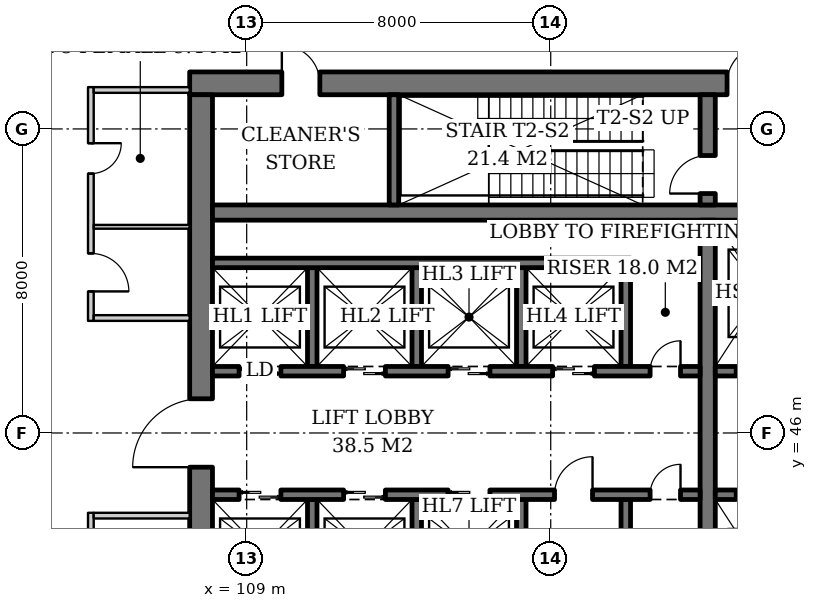
"""IFC4 building model, lengths in metres.
Left out: names, types, materials, properties, quantities, classifications, styles, units other than length and angle.
Written with IfcOpenShell. Run it as: python <this file> out.ifc"""

import sys

from ifc_helpers import new_model, si_unit, direction, frame, frame_2d, origin, place, context, subcontext, project, spatial, rectangle, extrude, element, fill, save


model = new_model("IFC4")
c1 = context("Model", 3, precision=1e-05, world=origin(), true_north=direction((0.0, 1.0)))
c2 = subcontext(c1, "Body", "Model", "MODEL_VIEW")
j1 = project(units=[si_unit("LENGTHUNIT", "METRE"), si_unit("PLANEANGLEUNIT", "RADIAN")], contexts=[c1])
p1 = place(None, origin())
s1 = spatial("IfcSite", under=j1, at=p1, CompositionType="ELEMENT")
p2 = place(p1, origin())
s2 = spatial("IfcBuilding", under=s1, at=p2, CompositionType="ELEMENT")
p3 = place(p2, frame((0.0, 0.0, -5.0)))
s3 = spatial("IfcBuildingStorey", under=s2, at=p3, CompositionType="ELEMENT", Elevation=-5.0)
p4 = place(p3, frame((107.5, 55.2, 0.0), z_axis=(0.0, 0.0, 1.0), x_axis=(1.0, 0.0, 0.0)))
e1 = element("IfcWall", 1, at=p4, inside=s3, PredefinedType="SHEAR", context=c2, shape_type="SweptSolid", body=[
    extrude(rectangle(XDim=19.0, YDim=0.6, at=frame_2d((9.5, 0.0))), origin(), (0.0, 0.0, 1.0), 5.0),
])
p5 = place(p4, frame((14.14, 0.0, 0.0)))
e2 = element("IfcOpeningElement", 2, at=p5, cuts=e1, PredefinedType="OPENING", context=c2, shape_type="SweptSolid", body=[
    extrude(rectangle(XDim=1.0, YDim=2.1, at=frame_2d((0.5, 1.05))), frame((0.0, 0.31, 0.0), z_axis=(0.0, -1.0, 0.0), x_axis=(1.0, 0.0, 0.0)), (0.0, 0.0, 1.0), 0.62),
])
p6 = place(p4, frame((2.425, 0.0, 0.0)))
e3 = element("IfcOpeningElement", 3, at=p6, cuts=e1, PredefinedType="OPENING", context=c2, shape_type="SweptSolid", body=[
    extrude(rectangle(XDim=1.0, YDim=2.1, at=frame_2d((0.5, 1.05))), frame((0.0, 0.31, 0.0), z_axis=(0.0, -1.0, 0.0), x_axis=(1.0, 0.0, 0.0)), (0.0, 0.0, 1.0), 0.62),
])
p7 = place(p3, frame((107.8, 37.1, 0.0), z_axis=(0.0, 0.0, 1.0), x_axis=(0.0, 1.0, 0.0)))
e4 = element("IfcWall", 4, at=p7, inside=s3, PredefinedType="SHEAR", context=c2, shape_type="SweptSolid", body=[
    extrude(rectangle(XDim=17.8, YDim=0.6, at=frame_2d((8.9, 0.0))), origin(), (0.0, 0.0, 1.0), 5.0),
])
p8 = place(p7, frame((8.0, 0.0, 0.0)))
e5 = element("IfcOpeningElement", 5, at=p8, cuts=e4, PredefinedType="OPENING", context=c2, shape_type="SweptSolid", body=[
    extrude(rectangle(XDim=1.8, YDim=2.4, at=frame_2d((0.9, 1.2))), frame((0.0, 0.31, 0.0), z_axis=(0.0, -1.0, 0.0), x_axis=(1.0, 0.0, 0.0)), (0.0, 0.0, 1.0), 0.62),
])
p9 = place(p3, frame((108.1, 51.8, 0.0), z_axis=(0.0, 0.0, 1.0), x_axis=(1.0, 0.0, 0.0)))
e6 = element("IfcWall", 6, at=p9, inside=s3, PredefinedType="SHEAR", context=c2, shape_type="SweptSolid", body=[
    extrude(rectangle(XDim=17.8, YDim=0.4, at=frame_2d((8.9, 0.0))), origin(), (0.0, 0.0, 1.0), 5.0),
])
p10 = place(p3, frame((121.13, 40.4, 0.0), z_axis=(0.0, 0.0, 1.0), x_axis=(0.0, 1.0, 0.0)))
e7 = element("IfcWall", 7, at=p10, inside=s3, PredefinedType="SHEAR", context=c2, shape_type="SweptSolid", body=[
    extrude(rectangle(XDim=11.2, YDim=0.4, at=frame_2d((5.6, 0.0))), origin(), (0.0, 0.0, 1.0), 5.0),
])
p11 = place(p3, frame((121.13, 52.0, 0.0), z_axis=(0.0, 0.0, 1.0), x_axis=(0.0, 1.0, 0.0)))
e8 = element("IfcWall", 8, at=p11, inside=s3, PredefinedType="SHEAR", context=c2, shape_type="SweptSolid", body=[
    extrude(rectangle(XDim=2.9, YDim=0.4, at=frame_2d((1.45, 0.0))), origin(), (0.0, 0.0, 1.0), 5.0),
])
p12 = place(p11, frame((0.3, 0.0, 0.0)))
e9 = element("IfcOpeningElement", 9, at=p12, cuts=e8, PredefinedType="OPENING", context=c2, shape_type="SweptSolid", body=[
    extrude(rectangle(XDim=1.0, YDim=2.1, at=frame_2d((0.5, 1.05))), frame((0.0, 0.21, 0.0), z_axis=(0.0, -1.0, 0.0), x_axis=(1.0, 0.0, 0.0)), (0.0, 0.0, 1.0), 0.42),
])
p13 = place(p3, frame((112.875, 52.0, 0.0), z_axis=(0.0, 0.0, 1.0), x_axis=(0.0, 1.0, 0.0)))
e10 = element("IfcWall", 10, at=p13, inside=s3, PredefinedType="SHEAR", context=c2, shape_type="SweptSolid", body=[
    extrude(rectangle(XDim=2.9, YDim=0.25, at=frame_2d((1.45, 0.0))), origin(), (0.0, 0.0, 1.0), 5.0),
])
for number, where, z_axis, x_axis in (
    (11, (110.725, 47.75, 0.0), (0.0, 0.0, 1.0), (0.0, 1.0, 0.0)),
    (12, (113.475, 47.75, 0.0), (0.0, 0.0, 1.0), (0.0, 1.0, 0.0)),
    (13, (116.225, 47.75, 0.0), (0.0, 0.0, 1.0), (0.0, 1.0, 0.0)),
    (14, (118.975, 47.75, 0.0), (0.0, 0.0, 1.0), (0.0, 1.0, 0.0)),
):
    element("IfcWall", number, at=place(p3, frame(where, z_axis=z_axis, x_axis=x_axis)), inside=s3, PredefinedType="SHEAR", context=c2, shape_type="SweptSolid", body=[
        extrude(rectangle(XDim=2.6, YDim=0.25, at=frame_2d((1.3, 0.0))), origin(), (0.0, 0.0, 1.0), 5.0),
    ])
p14 = place(p3, frame((108.1, 50.475, 0.0), z_axis=(0.0, 0.0, 1.0), x_axis=(1.0, 0.0, 0.0)))
e15 = element("IfcWall", 15, at=p14, inside=s3, PredefinedType="SHEAR", context=c2, shape_type="SweptSolid", body=[
    extrude(rectangle(XDim=11.0, YDim=0.25, at=frame_2d((5.5, 0.0))), origin(), (0.0, 0.0, 1.0), 5.0),
])
p15 = place(p3, frame((108.1, 47.625, 0.0), z_axis=(0.0, 0.0, 1.0), x_axis=(1.0, 0.0, 0.0)))
e16 = element("IfcWall", 16, at=p15, inside=s3, PredefinedType="SHEAR", context=c2, shape_type="SweptSolid", body=[
    extrude(rectangle(XDim=12.83, YDim=0.25, at=frame_2d((6.415, 0.0))), origin(), (0.0, 0.0, 1.0), 5.0),
])
p16 = place(p15, frame((0.7, 0.0, 0.0)))
e17 = element("IfcOpeningElement", 17, at=p16, cuts=e16, PredefinedType="OPENING", context=c2, shape_type="SweptSolid", body=[
    extrude(rectangle(XDim=1.1, YDim=2.2, at=frame_2d((0.55, 1.1))), frame((0.0, 0.135, 0.0), z_axis=(0.0, -1.0, 0.0), x_axis=(1.0, 0.0, 0.0)), (0.0, 0.0, 1.0), 0.27),
])
p17 = place(p15, frame((3.45, 0.0, 0.0)))
e18 = element("IfcOpeningElement", 18, at=p17, cuts=e16, PredefinedType="OPENING", context=c2, shape_type="SweptSolid", body=[
    extrude(rectangle(XDim=1.1, YDim=2.2, at=frame_2d((0.55, 1.1))), frame((0.0, 0.135, 0.0), z_axis=(0.0, -1.0, 0.0), x_axis=(1.0, 0.0, 0.0)), (0.0, 0.0, 1.0), 0.27),
])
p18 = place(p15, frame((6.2, 0.0, 0.0)))
e19 = element("IfcOpeningElement", 19, at=p18, cuts=e16, PredefinedType="OPENING", context=c2, shape_type="SweptSolid", body=[
    extrude(rectangle(XDim=1.1, YDim=2.2, at=frame_2d((0.55, 1.1))), frame((0.0, 0.135, 0.0), z_axis=(0.0, -1.0, 0.0), x_axis=(1.0, 0.0, 0.0)), (0.0, 0.0, 1.0), 0.27),
])
p19 = place(p15, frame((8.95, 0.0, 0.0)))
e20 = element("IfcOpeningElement", 20, at=p19, cuts=e16, PredefinedType="OPENING", context=c2, shape_type="SweptSolid", body=[
    extrude(rectangle(XDim=1.1, YDim=2.2, at=frame_2d((0.55, 1.1))), frame((0.0, 0.135, 0.0), z_axis=(0.0, -1.0, 0.0), x_axis=(1.0, 0.0, 0.0)), (0.0, 0.0, 1.0), 0.27),
])
p20 = place(p15, frame((11.515, 0.0, 0.0)))
e21 = element("IfcOpeningElement", 21, at=p20, cuts=e16, PredefinedType="OPENING", context=c2, shape_type="SweptSolid", body=[
    extrude(rectangle(XDim=0.8, YDim=2.0, at=frame_2d((0.4, 1.0))), frame((0.0, 0.135, 0.0), z_axis=(0.0, -1.0, 0.0), x_axis=(1.0, 0.0, 0.0)), (0.0, 0.0, 1.0), 0.27),
])
for number, where, z_axis, x_axis in (
    (22, (110.725, 44.25, 0.0), (0.0, 0.0, 1.0), (0.0, -1.0, 0.0)),
    (23, (113.475, 44.25, 0.0), (0.0, 0.0, 1.0), (0.0, -1.0, 0.0)),
    (24, (116.225, 44.25, 0.0), (0.0, 0.0, 1.0), (0.0, -1.0, 0.0)),
    (25, (118.975, 44.25, 0.0), (0.0, 0.0, 1.0), (0.0, -1.0, 0.0)),
):
    element("IfcWall", number, at=place(p3, frame(where, z_axis=z_axis, x_axis=x_axis)), inside=s3, PredefinedType="SHEAR", context=c2, shape_type="SweptSolid", body=[
        extrude(rectangle(XDim=2.6, YDim=0.25, at=frame_2d((1.3, 0.0))), origin(), (0.0, 0.0, 1.0), 5.0),
    ])
p21 = place(p3, frame((108.1, 44.375, 0.0), z_axis=(0.0, 0.0, 1.0), x_axis=(1.0, 0.0, 0.0)))
e26 = element("IfcWall", 26, at=p21, inside=s3, PredefinedType="SHEAR", context=c2, shape_type="SweptSolid", body=[
    extrude(rectangle(XDim=12.83, YDim=0.25, at=frame_2d((6.415, 0.0))), origin(), (0.0, 0.0, 1.0), 5.0),
])
p22 = place(p21, frame((0.7, 0.0, 0.0)))
e27 = element("IfcOpeningElement", 27, at=p22, cuts=e26, PredefinedType="OPENING", context=c2, shape_type="SweptSolid", body=[
    extrude(rectangle(XDim=1.1, YDim=2.2, at=frame_2d((0.55, 1.1))), frame((0.0, 0.135, 0.0), z_axis=(0.0, -1.0, 0.0), x_axis=(1.0, 0.0, 0.0)), (0.0, 0.0, 1.0), 0.27),
])
p23 = place(p21, frame((3.45, 0.0, 0.0)))
e28 = element("IfcOpeningElement", 28, at=p23, cuts=e26, PredefinedType="OPENING", context=c2, shape_type="SweptSolid", body=[
    extrude(rectangle(XDim=1.1, YDim=2.2, at=frame_2d((0.55, 1.1))), frame((0.0, 0.135, 0.0), z_axis=(0.0, -1.0, 0.0), x_axis=(1.0, 0.0, 0.0)), (0.0, 0.0, 1.0), 0.27),
])
p24 = place(p21, frame((6.2, 0.0, 0.0)))
e29 = element("IfcOpeningElement", 29, at=p24, cuts=e26, PredefinedType="OPENING", context=c2, shape_type="SweptSolid", body=[
    extrude(rectangle(XDim=1.1, YDim=2.2, at=frame_2d((0.55, 1.1))), frame((0.0, 0.135, 0.0), z_axis=(0.0, -1.0, 0.0), x_axis=(1.0, 0.0, 0.0)), (0.0, 0.0, 1.0), 0.27),
])
p25 = place(p21, frame((9.0, 0.0, 0.0)))
e30 = element("IfcOpeningElement", 30, at=p25, cuts=e26, PredefinedType="OPENING", context=c2, shape_type="SweptSolid", body=[
    extrude(rectangle(XDim=1.0, YDim=2.1, at=frame_2d((0.5, 1.05))), frame((0.0, 0.135, 0.0), z_axis=(0.0, -1.0, 0.0), x_axis=(1.0, 0.0, 0.0)), (0.0, 0.0, 1.0), 0.27),
])
p26 = place(p21, frame((11.515, 0.0, 0.0)))
e31 = element("IfcOpeningElement", 31, at=p26, cuts=e26, PredefinedType="OPENING", context=c2, shape_type="SweptSolid", body=[
    extrude(rectangle(XDim=0.8, YDim=2.0, at=frame_2d((0.4, 1.0))), frame((0.0, 0.135, 0.0), z_axis=(0.0, -1.0, 0.0), x_axis=(1.0, 0.0, 0.0)), (0.0, 0.0, 1.0), 0.27),
])
p27 = place(p3, frame((121.33, 47.625, 0.0), z_axis=(0.0, 0.0, 1.0), x_axis=(1.0, 0.0, 0.0)))
e32 = element("IfcWall", 32, at=p27, inside=s3, PredefinedType="SHEAR", context=c2, shape_type="SweptSolid", body=[
    extrude(rectangle(XDim=4.57, YDim=0.25, at=frame_2d((2.285, 0.0))), origin(), (0.0, 0.0, 1.0), 5.0),
])
p28 = place(p27, frame((0.55, 0.0, 0.0)))
e33 = element("IfcOpeningElement", 33, at=p28, cuts=e32, PredefinedType="OPENING", context=c2, shape_type="SweptSolid", body=[
    extrude(rectangle(XDim=1.4, YDim=2.4, at=frame_2d((0.7, 1.2))), frame((0.0, 0.135, 0.0), z_axis=(0.0, -1.0, 0.0), x_axis=(1.0, 0.0, 0.0)), (0.0, 0.0, 1.0), 0.27),
])
p29 = place(p27, frame((3.26, 0.0, 0.0)))
e34 = element("IfcOpeningElement", 34, at=p29, cuts=e32, PredefinedType="OPENING", context=c2, shape_type="SweptSolid", body=[
    extrude(rectangle(XDim=0.8, YDim=2.0, at=frame_2d((0.4, 1.0))), frame((0.0, 0.135, 0.0), z_axis=(0.0, -1.0, 0.0), x_axis=(1.0, 0.0, 0.0)), (0.0, 0.0, 1.0), 0.27),
])
p30 = place(p3, frame((121.33, 44.375, 0.0), z_axis=(0.0, 0.0, 1.0), x_axis=(1.0, 0.0, 0.0)))
e35 = element("IfcWall", 35, at=p30, inside=s3, PredefinedType="SHEAR", context=c2, shape_type="SweptSolid", body=[
    extrude(rectangle(XDim=4.57, YDim=0.25, at=frame_2d((2.285, 0.0))), origin(), (0.0, 0.0, 1.0), 5.0),
])
p31 = place(p30, frame((0.55, 0.0, 0.0)))
e36 = element("IfcOpeningElement", 36, at=p31, cuts=e35, PredefinedType="OPENING", context=c2, shape_type="SweptSolid", body=[
    extrude(rectangle(XDim=1.4, YDim=2.4, at=frame_2d((0.7, 1.2))), frame((0.0, 0.135, 0.0), z_axis=(0.0, -1.0, 0.0), x_axis=(1.0, 0.0, 0.0)), (0.0, 0.0, 1.0), 0.27),
])
p32 = place(p30, frame((3.26, 0.0, 0.0)))
e37 = element("IfcOpeningElement", 37, at=p32, cuts=e35, PredefinedType="OPENING", context=c2, shape_type="SweptSolid", body=[
    extrude(rectangle(XDim=0.8, YDim=2.0, at=frame_2d((0.4, 1.0))), frame((0.0, 0.135, 0.0), z_axis=(0.0, -1.0, 0.0), x_axis=(1.0, 0.0, 0.0)), (0.0, 0.0, 1.0), 0.27),
])
p33 = place(p3, frame((104.9, 55.1, 0.0), z_axis=(0.0, 0.0, 1.0), x_axis=(0.0, -1.0, 0.0)))
e38 = element("IfcWall", 38, at=p33, inside=s3, PredefinedType="PARTITIONING", context=c2, shape_type="SweptSolid", body=[
    extrude(rectangle(XDim=6.15, YDim=0.15, at=frame_2d((3.075, 0.0))), origin(), (0.0, 0.0, 1.0), 3.9),
])
p34 = place(p33, frame((1.475, 0.0, 0.0)))
e39 = element("IfcOpeningElement", 39, at=p34, cuts=e38, PredefinedType="OPENING", context=c2, shape_type="SweptSolid", body=[
    extrude(rectangle(XDim=0.8, YDim=2.1, at=frame_2d((0.4, 1.05))), frame((0.0, 0.085, 0.0), z_axis=(0.0, -1.0, 0.0), x_axis=(1.0, 0.0, 0.0)), (0.0, 0.0, 1.0), 0.17),
])
p35 = place(p33, frame((4.375, 0.0, 0.0)))
e40 = element("IfcOpeningElement", 40, at=p35, cuts=e38, PredefinedType="OPENING", context=c2, shape_type="SweptSolid", body=[
    extrude(rectangle(XDim=1.0, YDim=2.1, at=frame_2d((0.5, 1.05))), frame((0.0, 0.085, 0.0), z_axis=(0.0, -1.0, 0.0), x_axis=(1.0, 0.0, 0.0)), (0.0, 0.0, 1.0), 0.17),
])
p36 = place(p3, frame((104.975, 55.025, 0.0), z_axis=(0.0, 0.0, 1.0), x_axis=(1.0, 0.0, 0.0)))
e41 = element("IfcWall", 41, at=p36, inside=s3, PredefinedType="PARTITIONING", context=c2, shape_type="SweptSolid", body=[
    extrude(rectangle(XDim=2.525, YDim=0.15, at=frame_2d((1.262, 0.0))), origin(), (0.0, 0.0, 1.0), 3.9),
])
p37 = place(p3, frame((104.975, 51.425, 0.0), z_axis=(0.0, 0.0, 1.0), x_axis=(1.0, 0.0, 0.0)))
e42 = element("IfcWall", 42, at=p37, inside=s3, PredefinedType="SOLIDWALL", context=c2, shape_type="SweptSolid", body=[
    extrude(rectangle(XDim=2.525, YDim=0.1, at=frame_2d((1.262, 0.0))), origin(), (0.0, 0.0, 1.0), 4.7),
])
p38 = place(p3, frame((104.975, 49.025, 0.0), z_axis=(0.0, 0.0, 1.0), x_axis=(1.0, 0.0, 0.0)))
e43 = element("IfcWall", 43, at=p38, inside=s3, PredefinedType="PARTITIONING", context=c2, shape_type="SweptSolid", body=[
    extrude(rectangle(XDim=2.525, YDim=0.15, at=frame_2d((1.262, 0.0))), origin(), (0.0, 0.0, 1.0), 4.7),
])
p39 = place(p3, frame((104.9, 43.9, 0.0), z_axis=(0.0, 0.0, 1.0), x_axis=(0.0, -1.0, 0.0)))
e44 = element("IfcWall", 44, at=p39, inside=s3, PredefinedType="PARTITIONING", context=c2, shape_type="SweptSolid", body=[
    extrude(rectangle(XDim=3.75, YDim=0.15, at=frame_2d((1.875, 0.0))), origin(), (0.0, 0.0, 1.0), 3.947),
])
p40 = place(p39, frame((1.475, 0.0, 0.0)))
e45 = element("IfcOpeningElement", 45, at=p40, cuts=e44, PredefinedType="OPENING", context=c2, shape_type="SweptSolid", body=[
    extrude(rectangle(XDim=0.8, YDim=2.1, at=frame_2d((0.4, 1.05))), frame((0.0, 0.085, 0.0), z_axis=(0.0, -1.0, 0.0), x_axis=(1.0, 0.0, 0.0)), (0.0, 0.0, 1.0), 0.17),
])
p41 = place(p3, frame((104.975, 43.825, 0.0), z_axis=(0.0, 0.0, 1.0), x_axis=(1.0, 0.0, 0.0)))
e46 = element("IfcWall", 46, at=p41, inside=s3, PredefinedType="PARTITIONING", context=c2, shape_type="SweptSolid", body=[
    extrude(rectangle(XDim=2.525, YDim=0.15, at=frame_2d((1.262, 0.0))), origin(), (0.0, 0.0, 1.0), 4.7),
])
p42 = place(p16, origin())
e47 = element("IfcDoor", 47, at=p42, inside=s3, OperationType="DOUBLE_DOOR_SLIDING", PredefinedType="DOOR", context=c2, shape_type="SweptSolid", body=[
    extrude(rectangle(XDim=1.1, YDim=2.2, at=frame_2d((0.55, 1.1))), frame((0.0, 0.025, 0.0), z_axis=(0.0, -1.0, 0.0), x_axis=(1.0, 0.0, 0.0)), (0.0, 0.0, 1.0), 0.05),
])
fill(e17, e47)
p43 = place(p17, origin())
e48 = element("IfcDoor", 48, at=p43, inside=s3, OperationType="DOUBLE_DOOR_SLIDING", PredefinedType="DOOR", context=c2, shape_type="SweptSolid", body=[
    extrude(rectangle(XDim=1.1, YDim=2.2, at=frame_2d((0.55, 1.1))), frame((0.0, 0.025, 0.0), z_axis=(0.0, -1.0, 0.0), x_axis=(1.0, 0.0, 0.0)), (0.0, 0.0, 1.0), 0.05),
])
fill(e18, e48)
p44 = place(p18, origin())
e49 = element("IfcDoor", 49, at=p44, inside=s3, OperationType="DOUBLE_DOOR_SLIDING", PredefinedType="DOOR", context=c2, shape_type="SweptSolid", body=[
    extrude(rectangle(XDim=1.1, YDim=2.2, at=frame_2d((0.55, 1.1))), frame((0.0, 0.025, 0.0), z_axis=(0.0, -1.0, 0.0), x_axis=(1.0, 0.0, 0.0)), (0.0, 0.0, 1.0), 0.05),
])
fill(e19, e49)
p45 = place(p19, origin())
e50 = element("IfcDoor", 50, at=p45, inside=s3, OperationType="DOUBLE_DOOR_SLIDING", PredefinedType="DOOR", context=c2, shape_type="SweptSolid", body=[
    extrude(rectangle(XDim=1.1, YDim=2.2, at=frame_2d((0.55, 1.1))), frame((0.0, 0.025, 0.0), z_axis=(0.0, -1.0, 0.0), x_axis=(1.0, 0.0, 0.0)), (0.0, 0.0, 1.0), 0.05),
])
fill(e20, e50)
p46 = place(p20, origin())
e51 = element("IfcDoor", 51, at=p46, inside=s3, OperationType="SINGLE_SWING_RIGHT", PredefinedType="DOOR", context=c2, shape_type="SweptSolid", body=[
    extrude(rectangle(XDim=0.8, YDim=2.0, at=frame_2d((0.4, 1.0))), frame((0.0, 0.025, 0.0), z_axis=(0.0, -1.0, 0.0), x_axis=(1.0, 0.0, 0.0)), (0.0, 0.0, 1.0), 0.05),
])
fill(e21, e51)
p47 = place(p22, origin())
e52 = element("IfcDoor", 52, at=p47, inside=s3, OperationType="DOUBLE_DOOR_SLIDING", PredefinedType="DOOR", context=c2, shape_type="SweptSolid", body=[
    extrude(rectangle(XDim=1.1, YDim=2.2, at=frame_2d((0.55, 1.1))), frame((0.0, 0.025, 0.0), z_axis=(0.0, -1.0, 0.0), x_axis=(1.0, 0.0, 0.0)), (0.0, 0.0, 1.0), 0.05),
])
fill(e27, e52)
p48 = place(p23, origin())
e53 = element("IfcDoor", 53, at=p48, inside=s3, OperationType="DOUBLE_DOOR_SLIDING", PredefinedType="DOOR", context=c2, shape_type="SweptSolid", body=[
    extrude(rectangle(XDim=1.1, YDim=2.2, at=frame_2d((0.55, 1.1))), frame((0.0, 0.025, 0.0), z_axis=(0.0, -1.0, 0.0), x_axis=(1.0, 0.0, 0.0)), (0.0, 0.0, 1.0), 0.05),
])
fill(e28, e53)
p49 = place(p24, origin())
e54 = element("IfcDoor", 54, at=p49, inside=s3, OperationType="DOUBLE_DOOR_SLIDING", PredefinedType="DOOR", context=c2, shape_type="SweptSolid", body=[
    extrude(rectangle(XDim=1.1, YDim=2.2, at=frame_2d((0.55, 1.1))), frame((0.0, 0.025, 0.0), z_axis=(0.0, -1.0, 0.0), x_axis=(1.0, 0.0, 0.0)), (0.0, 0.0, 1.0), 0.05),
])
fill(e29, e54)
p50 = place(p25, origin())
e55 = element("IfcDoor", 55, at=p50, inside=s3, OperationType="SINGLE_SWING_RIGHT", PredefinedType="DOOR", context=c2, shape_type="SweptSolid", body=[
    extrude(rectangle(XDim=1.0, YDim=2.1, at=frame_2d((0.5, 1.05))), frame((0.0, 0.025, 0.0), z_axis=(0.0, -1.0, 0.0), x_axis=(1.0, 0.0, 0.0)), (0.0, 0.0, 1.0), 0.05),
])
fill(e30, e55)
p51 = place(p26, origin())
e56 = element("IfcDoor", 56, at=p51, inside=s3, OperationType="SINGLE_SWING_RIGHT", PredefinedType="DOOR", context=c2, shape_type="SweptSolid", body=[
    extrude(rectangle(XDim=0.8, YDim=2.0, at=frame_2d((0.4, 1.0))), frame((0.0, 0.025, 0.0), z_axis=(0.0, -1.0, 0.0), x_axis=(1.0, 0.0, 0.0)), (0.0, 0.0, 1.0), 0.05),
])
fill(e31, e56)
p52 = place(p28, origin())
e57 = element("IfcDoor", 57, at=p52, inside=s3, OperationType="DOUBLE_DOOR_SLIDING", PredefinedType="DOOR", context=c2, shape_type="SweptSolid", body=[
    extrude(rectangle(XDim=1.4, YDim=2.4, at=frame_2d((0.7, 1.2))), frame((0.0, 0.025, 0.0), z_axis=(0.0, -1.0, 0.0), x_axis=(1.0, 0.0, 0.0)), (0.0, 0.0, 1.0), 0.05),
])
fill(e33, e57)
p53 = place(p31, origin())
e58 = element("IfcDoor", 58, at=p53, inside=s3, OperationType="DOUBLE_DOOR_SLIDING", PredefinedType="DOOR", context=c2, shape_type="SweptSolid", body=[
    extrude(rectangle(XDim=1.4, YDim=2.4, at=frame_2d((0.7, 1.2))), frame((0.0, 0.025, 0.0), z_axis=(0.0, -1.0, 0.0), x_axis=(1.0, 0.0, 0.0)), (0.0, 0.0, 1.0), 0.05),
])
fill(e36, e58)
p54 = place(p12, origin())
e59 = element("IfcDoor", 59, at=p54, inside=s3, OperationType="SINGLE_SWING_LEFT", PredefinedType="DOOR", context=c2, shape_type="SweptSolid", body=[
    extrude(rectangle(XDim=1.0, YDim=2.1, at=frame_2d((0.5, 1.05))), frame((0.0, 0.025, 0.0), z_axis=(0.0, -1.0, 0.0), x_axis=(1.0, 0.0, 0.0)), (0.0, 0.0, 1.0), 0.05),
])
fill(e9, e59)
p55 = place(p5, origin())
e60 = element("IfcDoor", 60, at=p55, inside=s3, OperationType="SINGLE_SWING_RIGHT", PredefinedType="DOOR", context=c2, shape_type="SweptSolid", body=[
    extrude(rectangle(XDim=1.0, YDim=2.1, at=frame_2d((0.5, 1.05))), frame((0.0, 0.025, 0.0), z_axis=(0.0, -1.0, 0.0), x_axis=(1.0, 0.0, 0.0)), (0.0, 0.0, 1.0), 0.05),
])
fill(e2, e60)
p56 = place(p8, origin())
e61 = element("IfcDoor", 61, at=p56, inside=s3, OperationType="DOUBLE_DOOR_SINGLE_SWING", PredefinedType="DOOR", context=c2, shape_type="SweptSolid", body=[
    extrude(rectangle(XDim=1.8, YDim=2.4, at=frame_2d((0.9, 1.2))), frame((0.0, 0.025, 0.0), z_axis=(0.0, -1.0, 0.0), x_axis=(1.0, 0.0, 0.0)), (0.0, 0.0, 1.0), 0.05),
])
fill(e5, e61)
p57 = place(p6, origin())
e62 = element("IfcDoor", 62, at=p57, inside=s3, OperationType="SINGLE_SWING_LEFT", PredefinedType="DOOR", context=c2, shape_type="SweptSolid", body=[
    extrude(rectangle(XDim=1.0, YDim=2.1, at=frame_2d((0.5, 1.05))), frame((0.0, -0.24, 0.0), z_axis=(0.0, -1.0, 0.0), x_axis=(1.0, 0.0, 0.0)), (0.0, 0.0, 1.0), 0.05),
])
fill(e3, e62)
p58 = place(p34, origin())
e63 = element("IfcDoor", 63, at=p58, inside=s3, OperationType="SINGLE_SWING_LEFT", PredefinedType="DOOR", context=c2, shape_type="SweptSolid", body=[
    extrude(rectangle(XDim=0.8, YDim=2.1, at=frame_2d((0.4, 1.05))), frame((0.0, 0.025, 0.0), z_axis=(0.0, -1.0, 0.0), x_axis=(1.0, 0.0, 0.0)), (0.0, 0.0, 1.0), 0.05),
])
fill(e39, e63)
p59 = place(p35, origin())
e64 = element("IfcDoor", 64, at=p59, inside=s3, OperationType="SINGLE_SWING_RIGHT", PredefinedType="DOOR", context=c2, shape_type="SweptSolid", body=[
    extrude(rectangle(XDim=1.0, YDim=2.1, at=frame_2d((0.5, 1.05))), frame((0.0, 0.025, 0.0), z_axis=(0.0, -1.0, 0.0), x_axis=(1.0, 0.0, 0.0)), (0.0, 0.0, 1.0), 0.05),
])
fill(e40, e64)
save(model, sys.argv[1])
